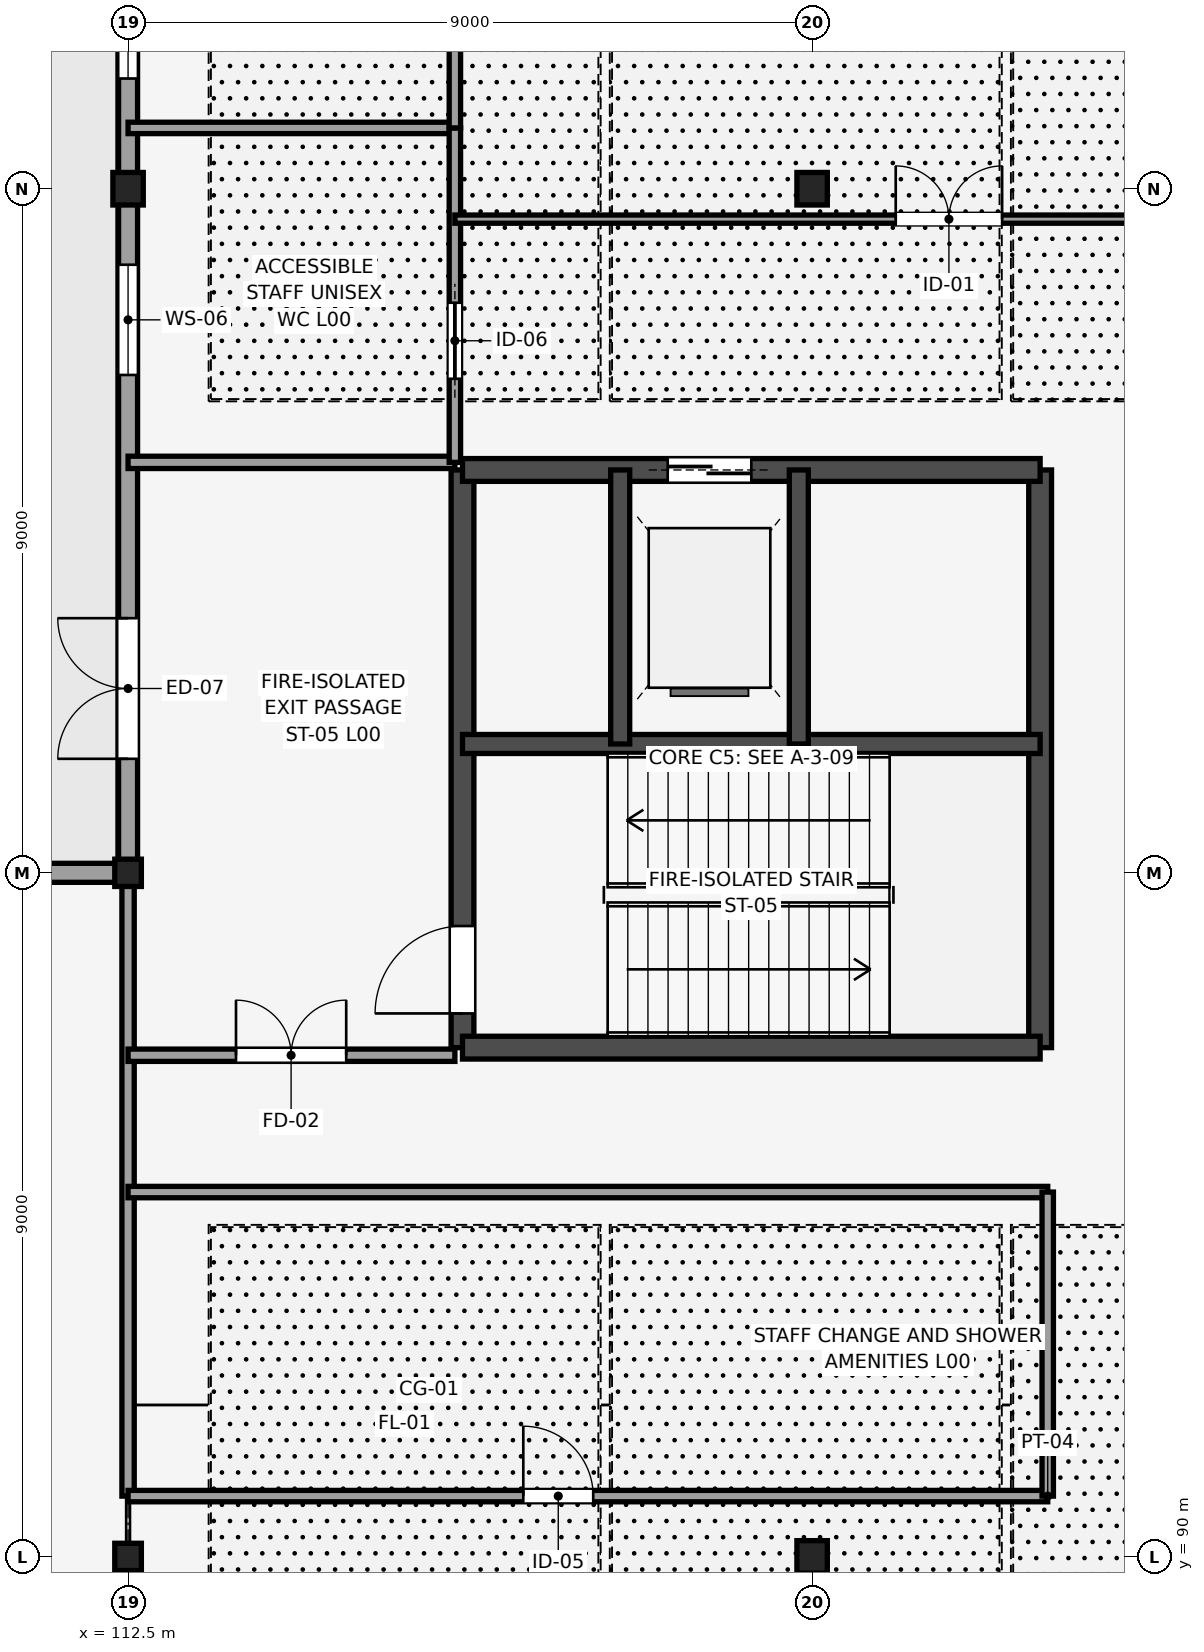
"""IFC4 building model, lengths in metres.
Left out: names, types, materials, properties, quantities, classifications, styles, units other than length and angle.
Written with IfcOpenShell. Run it as: python <this file> out.ifc"""

import sys

from ifc_helpers import new_model, si_unit, direction, frame, frame_2d, origin, origin_2d, place, context, subcontext, project, spatial, rectangle, i_section, extrude, element, fill, save


model = new_model("IFC4")
c1 = context("Model", 3, precision=1e-05, world=origin(), true_north=direction((0.0, 1.0)))
c2 = subcontext(c1, "Body", "Model", "MODEL_VIEW")
j1 = project(units=[si_unit("LENGTHUNIT", "METRE"), si_unit("PLANEANGLEUNIT", "RADIAN")], contexts=[c1])
p1 = place(None, origin())
s1 = spatial("IfcSite", under=j1, at=p1, CompositionType="ELEMENT")
p2 = place(p1, origin())
s2 = spatial("IfcBuilding", under=s1, at=p2, CompositionType="ELEMENT")
p3 = place(p2, origin())
s3 = spatial("IfcBuildingStorey", under=s2, at=p3, CompositionType="ELEMENT", Elevation=0.0)
for number, where, z_axis, x_axis in (
    (1, (112.5, 90.0, 0.0), (0.0, 0.0, 1.0), (1.0, 0.0, 0.0)),
    (2, (112.5, 99.0, 0.0), (0.0, 0.0, 1.0), (1.0, 0.0, 0.0)),
):
    element("IfcColumn", number, at=place(p3, frame(where, z_axis=z_axis, x_axis=x_axis)), inside=s3, PredefinedType="COLUMN", context=c2, shape_type="SweptSolid", body=[
        extrude(i_section(OverallWidth=0.35, OverallDepth=0.359, WebThickness=0.016, FlangeThickness=0.024, FilletRadius=0.014, at=origin_2d()), origin(), (0.0, 0.0, 1.0), 5.4),
    ])
for number, where, z_axis, x_axis in (
    (3, (112.5, 108.0, 0.0), (0.0, 0.0, 1.0), (1.0, 0.0, 0.0)),
    (4, (121.5, 90.0, 0.0), (0.0, 0.0, 1.0), (1.0, 0.0, 0.0)),
    (5, (121.5, 108.0, 0.0), (0.0, 0.0, 1.0), (1.0, 0.0, 0.0)),
):
    element("IfcColumn", number, at=place(p3, frame(where, z_axis=z_axis, x_axis=x_axis)), inside=s3, PredefinedType="COLUMN", context=c2, shape_type="SweptSolid", body=[
        extrude(i_section(OverallWidth=0.4, OverallDepth=0.428, WebThickness=0.02, FlangeThickness=0.028, FilletRadius=0.016, at=origin_2d()), origin(), (0.0, 0.0, 1.0), 5.4),
    ])
p4 = place(p3, frame((116.9, 96.7, 0.0), z_axis=(0.0, 0.0, 1.0), x_axis=(0.0, 1.0, 0.0)))
e6 = element("IfcWall", 6, at=p4, inside=s3, PredefinedType="SHEAR", context=c2, shape_type="SweptSolid", body=[
    extrude(rectangle(XDim=7.6, YDim=0.3, at=frame_2d((3.8, 0.0))), origin(), (0.0, 0.0, 1.0), 5.4),
])
p5 = place(p4, frame((0.45, 0.0, 0.0)))
e7 = element("IfcOpeningElement", 7, at=p5, cuts=e6, PredefinedType="OPENING", context=c2, shape_type="SweptSolid", body=[
    extrude(rectangle(XDim=1.15, YDim=2.15, at=frame_2d((0.575, 1.075))), frame((0.0, 0.16, 0.0), z_axis=(0.0, -1.0, 0.0), x_axis=(1.0, 0.0, 0.0)), (0.0, 0.0, 1.0), 0.32),
])
for number, where, z_axis, x_axis in (
    (8, (124.5, 96.7, 0.0), (0.0, 0.0, 1.0), (0.0, 1.0, 0.0)),
    (9, (116.9, 96.7, 0.0), (0.0, 0.0, 1.0), (1.0, 0.0, 0.0)),
):
    element("IfcWall", number, at=place(p3, frame(where, z_axis=z_axis, x_axis=x_axis)), inside=s3, PredefinedType="SHEAR", context=c2, shape_type="SweptSolid", body=[
        extrude(rectangle(XDim=7.6, YDim=0.3, at=frame_2d((3.8, 0.0))), origin(), (0.0, 0.0, 1.0), 5.4),
    ])
p6 = place(p3, frame((116.9, 104.3, 0.0), z_axis=(0.0, 0.0, 1.0), x_axis=(1.0, 0.0, 0.0)))
e10 = element("IfcWall", 10, at=p6, inside=s3, PredefinedType="SHEAR", context=c2, shape_type="SweptSolid", body=[
    extrude(rectangle(XDim=7.6, YDim=0.3, at=frame_2d((3.8, 0.0))), origin(), (0.0, 0.0, 1.0), 5.4),
])
p7 = place(p6, frame((2.7, 0.0, 0.0)))
e11 = element("IfcOpeningElement", 11, at=p7, cuts=e10, PredefinedType="OPENING", context=c2, shape_type="SweptSolid", body=[
    extrude(rectangle(XDim=1.1, YDim=2.2, at=frame_2d((0.55, 1.1))), frame((0.0, 0.16, 0.0), z_axis=(0.0, -1.0, 0.0), x_axis=(1.0, 0.0, 0.0)), (0.0, 0.0, 1.0), 0.32),
])
p8 = place(p3, frame((116.9, 100.695, 0.0), z_axis=(0.0, 0.0, 1.0), x_axis=(1.0, 0.0, 0.0)))
e12 = element("IfcWall", 12, at=p8, inside=s3, PredefinedType="SHEAR", context=c2, shape_type="SweptSolid", body=[
    extrude(rectangle(XDim=7.6, YDim=0.25, at=frame_2d((3.8, 0.0))), origin(), (0.0, 0.0, 1.0), 5.4),
])
for number, where, z_axis, x_axis in (
    (13, (118.975, 100.695, 0.0), (0.0, 0.0, 1.0), (0.0, 1.0, 0.0)),
    (14, (121.325, 100.695, 0.0), (0.0, 0.0, 1.0), (0.0, 1.0, 0.0)),
):
    element("IfcWall", number, at=place(p3, frame(where, z_axis=z_axis, x_axis=x_axis)), inside=s3, PredefinedType="SHEAR", context=c2, shape_type="SweptSolid", body=[
        extrude(rectangle(XDim=3.605, YDim=0.25, at=frame_2d((1.802, 0.0))), origin(), (0.0, 0.0, 1.0), 5.4),
    ])
p9 = place(p3, frame((112.5, 99.0, 0.0), z_axis=(0.0, 0.0, 1.0), x_axis=(-1.0, 0.0, 0.0)))
e15 = element("IfcWall", 15, at=p9, inside=s3, PredefinedType="STANDARD", context=c2, shape_type="SweptSolid", body=[
    extrude(rectangle(XDim=13.5, YDim=0.25, at=frame_2d((6.75, 0.0))), origin(), (0.0, 0.0, 1.0), 4.667),
])
p10 = place(p9, frame((1.35, 0.0, 1.0)))
e16 = element("IfcOpeningElement", 16, at=p10, cuts=e15, PredefinedType="OPENING", context=c2, shape_type="SweptSolid", body=[
    extrude(rectangle(XDim=1.8, YDim=1.5, at=frame_2d((0.9, 0.75))), frame((0.0, 0.135, 0.0), z_axis=(0.0, -1.0, 0.0), x_axis=(1.0, 0.0, 0.0)), (0.0, 0.0, 1.0), 0.27),
])
p11 = place(p9, frame((9.6, 0.0, 1.0)))
e17 = element("IfcOpeningElement", 17, at=p11, cuts=e15, PredefinedType="OPENING", context=c2, shape_type="SweptSolid", body=[
    extrude(rectangle(XDim=1.8, YDim=1.5, at=frame_2d((0.9, 0.75))), frame((0.0, 0.135, 0.0), z_axis=(0.0, -1.0, 0.0), x_axis=(1.0, 0.0, 0.0)), (0.0, 0.0, 1.0), 0.27),
])
p12 = place(p9, frame((5.6, 0.0, 1.0)))
e18 = element("IfcOpeningElement", 18, at=p12, cuts=e15, PredefinedType="OPENING", context=c2, shape_type="SweptSolid", body=[
    extrude(rectangle(XDim=3.0, YDim=1.5, at=frame_2d((1.5, 0.75))), frame((0.0, 0.135, 0.0), z_axis=(0.0, -1.0, 0.0), x_axis=(1.0, 0.0, 0.0)), (0.0, 0.0, 1.0), 0.27),
])
p13 = place(p3, frame((112.5, 99.0, 0.0), z_axis=(0.0, 0.0, 1.0), x_axis=(0.0, 1.0, 0.0)))
e19 = element("IfcWall", 19, at=p13, inside=s3, PredefinedType="STANDARD", context=c2, shape_type="SweptSolid", body=[
    extrude(rectangle(XDim=12.6, YDim=0.25, at=frame_2d((6.3, 0.0))), origin(), (0.0, 0.0, 1.0), 4.746),
])
p14 = place(p13, frame((10.45, 0.0, 1.0)))
e20 = element("IfcOpeningElement", 20, at=p14, cuts=e19, PredefinedType="OPENING", context=c2, shape_type="SweptSolid", body=[
    extrude(rectangle(XDim=1.5, YDim=1.5, at=frame_2d((0.75, 0.75))), frame((0.0, 0.135, 0.0), z_axis=(0.0, -1.0, 0.0), x_axis=(1.0, 0.0, 0.0)), (0.0, 0.0, 1.0), 0.27),
])
p15 = place(p13, frame((1.5, 0.0, 0.0)))
e21 = element("IfcOpeningElement", 21, at=p15, cuts=e19, PredefinedType="OPENING", context=c2, shape_type="SweptSolid", body=[
    extrude(rectangle(XDim=1.85, YDim=2.2, at=frame_2d((0.925, 1.1))), frame((0.0, 0.135, 0.0), z_axis=(0.0, -1.0, 0.0), x_axis=(1.0, 0.0, 0.0)), (0.0, 0.0, 1.0), 0.27),
])
p16 = place(p13, frame((6.55, 0.0, 1.0)))
e22 = element("IfcOpeningElement", 22, at=p16, cuts=e19, PredefinedType="OPENING", context=c2, shape_type="SweptSolid", body=[
    extrude(rectangle(XDim=1.45, YDim=1.55, at=frame_2d((0.725, 0.775))), frame((0.0, 0.135, 0.0), z_axis=(0.0, -1.0, 0.0), x_axis=(1.0, 0.0, 0.0)), (0.0, 0.0, 1.0), 0.27),
])
p17 = place(p3, frame((112.5, 90.8, 0.0), z_axis=(0.0, 0.0, 1.0), x_axis=(0.0, 1.0, 0.0)))
e23 = element("IfcWall", 23, at=p17, inside=s3, PredefinedType="PARTITIONING", context=c2, shape_type="SweptSolid", body=[
    extrude(rectangle(XDim=8.2, YDim=0.162, at=frame_2d((4.1, 0.0))), origin(), (0.0, 0.0, 1.0), 4.746),
])
p18 = place(p3, frame((112.5, 90.8, 0.0), z_axis=(0.0, 0.0, 1.0), x_axis=(1.0, 0.0, 0.0)))
e24 = element("IfcWall", 24, at=p18, inside=s3, PredefinedType="PARTITIONING", context=c2, shape_type="SweptSolid", body=[
    extrude(rectangle(XDim=12.1, YDim=0.15, at=frame_2d((6.05, 0.0))), origin(), (0.0, 0.0, 1.0), 5.22),
])
p19 = place(p18, frame((5.2, 0.0, 0.0)))
e25 = element("IfcOpeningElement", 25, at=p19, cuts=e24, PredefinedType="OPENING", context=c2, shape_type="SweptSolid", body=[
    extrude(rectangle(XDim=0.92, YDim=2.15, at=frame_2d((0.46, 1.075))), frame((0.0, 0.085, 0.0), z_axis=(0.0, -1.0, 0.0), x_axis=(1.0, 0.0, 0.0)), (0.0, 0.0, 1.0), 0.17),
])
p20 = place(p3, frame((112.5, 94.8, 0.0), z_axis=(0.0, 0.0, 1.0), x_axis=(1.0, 0.0, 0.0)))
e26 = element("IfcWall", 26, at=p20, inside=s3, PredefinedType="PARTITIONING", context=c2, shape_type="SweptSolid", body=[
    extrude(rectangle(XDim=12.1, YDim=0.15, at=frame_2d((6.05, 0.0))), origin(), (0.0, 0.0, 1.0), 5.22),
])
p21 = place(p3, frame((124.6, 90.8, 0.0), z_axis=(0.0, 0.0, 1.0), x_axis=(0.0, 1.0, 0.0)))
e27 = element("IfcWall", 27, at=p21, inside=s3, PredefinedType="PARTITIONING", context=c2, shape_type="SweptSolid", body=[
    extrude(rectangle(XDim=4.0, YDim=0.15, at=frame_2d((2.0, 0.0))), origin(), (0.0, 0.0, 1.0), 5.22),
])
p22 = place(p3, frame((112.5, 96.6, 0.0), z_axis=(0.0, 0.0, 1.0), x_axis=(1.0, 0.0, 0.0)))
e28 = element("IfcWall", 28, at=p22, inside=s3, PredefinedType="PARTITIONING", context=c2, shape_type="SweptSolid", body=[
    extrude(rectangle(XDim=4.3, YDim=0.162, at=frame_2d((2.15, 0.0))), origin(), (0.0, 0.0, 1.0), 5.22),
])
p23 = place(p22, frame((1.42, 0.0, 0.0)))
e29 = element("IfcOpeningElement", 29, at=p23, cuts=e28, PredefinedType="OPENING", context=c2, shape_type="SweptSolid", body=[
    extrude(rectangle(XDim=1.45, YDim=2.2, at=frame_2d((0.725, 1.1))), frame((0.0, 0.091, 0.0), z_axis=(0.0, -1.0, 0.0), x_axis=(1.0, 0.0, 0.0)), (0.0, 0.0, 1.0), 0.182),
])
p24 = place(p3, frame((112.5, 104.4, 0.0), z_axis=(0.0, 0.0, 1.0), x_axis=(1.0, 0.0, 0.0)))
e30 = element("IfcWall", 30, at=p24, inside=s3, PredefinedType="PARTITIONING", context=c2, shape_type="SweptSolid", body=[
    extrude(rectangle(XDim=4.3, YDim=0.162, at=frame_2d((2.15, 0.0))), origin(), (0.0, 0.0, 1.0), 5.22),
])
p25 = place(p3, frame((112.5, 108.8, 0.0), z_axis=(0.0, 0.0, 1.0), x_axis=(1.0, 0.0, 0.0)))
e31 = element("IfcWall", 31, at=p25, inside=s3, PredefinedType="PARTITIONING", context=c2, shape_type="SweptSolid", body=[
    extrude(rectangle(XDim=4.3, YDim=0.15, at=frame_2d((2.15, 0.0))), origin(), (0.0, 0.0, 1.0), 5.22),
])
p26 = place(p3, frame((116.8, 104.4, 0.0), z_axis=(0.0, 0.0, 1.0), x_axis=(0.0, 1.0, 0.0)))
e32 = element("IfcWall", 32, at=p26, inside=s3, PredefinedType="PARTITIONING", context=c2, shape_type="SweptSolid", body=[
    extrude(rectangle(XDim=4.4, YDim=0.15, at=frame_2d((2.2, 0.0))), origin(), (0.0, 0.0, 1.0), 5.22),
])
p27 = place(p26, frame((1.1, 0.0, 0.0)))
e33 = element("IfcOpeningElement", 33, at=p27, cuts=e32, PredefinedType="OPENING", context=c2, shape_type="SweptSolid", body=[
    extrude(rectangle(XDim=1.0, YDim=2.15, at=frame_2d((0.5, 1.075))), frame((0.0, 0.085, 0.0), z_axis=(0.0, -1.0, 0.0), x_axis=(1.0, 0.0, 0.0)), (0.0, 0.0, 1.0), 0.17),
])
p28 = place(p3, frame((116.8, 108.8, 0.0), z_axis=(0.0, 0.0, 1.0), x_axis=(0.0, 1.0, 0.0)))
e34 = element("IfcWall", 34, at=p28, inside=s3, PredefinedType="PARTITIONING", context=c2, shape_type="SweptSolid", body=[
    extrude(rectangle(XDim=2.8, YDim=0.15, at=frame_2d((1.4, 0.0))), origin(), (0.0, 0.0, 1.0), 5.22),
])
p29 = place(p3, frame((116.8, 107.6, 0.0), z_axis=(0.0, 0.0, 1.0), x_axis=(1.0, 0.0, 0.0)))
e35 = element("IfcWall", 35, at=p29, inside=s3, PredefinedType="PARTITIONING", context=c2, shape_type="SweptSolid", body=[
    extrude(rectangle(XDim=14.6, YDim=0.108, at=frame_2d((7.3, 0.0))), origin(), (0.0, 0.0, 1.0), 5.22),
])
p30 = place(p29, frame((5.8, 0.0, 0.0)))
e36 = element("IfcOpeningElement", 36, at=p30, cuts=e35, PredefinedType="OPENING", context=c2, shape_type="SweptSolid", body=[
    extrude(rectangle(XDim=1.4, YDim=2.2, at=frame_2d((0.7, 1.1))), frame((0.0, 0.064, 0.0), z_axis=(0.0, -1.0, 0.0), x_axis=(1.0, 0.0, 0.0)), (0.0, 0.0, 1.0), 0.128),
])
p31 = place(p14, origin())
e37 = element("IfcWindow", 37, at=p31, inside=s3, PartitioningType="SINGLE_PANEL", PredefinedType="WINDOW", context=c2, shape_type="SweptSolid", body=[
    extrude(rectangle(XDim=1.5, YDim=1.5, at=frame_2d((0.75, 0.75))), frame((0.0, 0.03, 0.0), z_axis=(0.0, -1.0, 0.0), x_axis=(1.0, 0.0, 0.0)), (0.0, 0.0, 1.0), 0.06),
])
fill(e20, e37)
p32 = place(p15, origin())
e38 = element("IfcDoor", 38, at=p32, inside=s3, OperationType="DOUBLE_DOOR_SINGLE_SWING", PredefinedType="DOOR", context=c2, shape_type="SweptSolid", body=[
    extrude(rectangle(XDim=1.85, YDim=2.2, at=frame_2d((0.925, 1.1))), frame((0.0, 0.025, 0.0), z_axis=(0.0, -1.0, 0.0), x_axis=(1.0, 0.0, 0.0)), (0.0, 0.0, 1.0), 0.05),
])
fill(e21, e38)
p33 = place(p16, origin())
e39 = element("IfcWindow", 39, at=p33, inside=s3, PartitioningType="SINGLE_PANEL", PredefinedType="WINDOW", context=c2, shape_type="SweptSolid", body=[
    extrude(rectangle(XDim=1.45, YDim=1.55, at=frame_2d((0.725, 0.775))), frame((0.0, 0.03, 0.0), z_axis=(0.0, -1.0, 0.0), x_axis=(1.0, 0.0, 0.0)), (0.0, 0.0, 1.0), 0.06),
])
fill(e22, e39)
p34 = place(p5, origin())
e40 = element("IfcDoor", 40, at=p34, inside=s3, OperationType="SINGLE_SWING_LEFT", PredefinedType="DOOR", context=c2, shape_type="SweptSolid", body=[
    extrude(rectangle(XDim=1.15, YDim=2.15, at=frame_2d((0.575, 1.075))), frame((0.0, 0.025, 0.0), z_axis=(0.0, -1.0, 0.0), x_axis=(1.0, 0.0, 0.0)), (0.0, 0.0, 1.0), 0.05),
])
fill(e7, e40)
p35 = place(p7, origin())
e41 = element("IfcDoor", 41, at=p35, inside=s3, OperationType="DOUBLE_DOOR_SLIDING", PredefinedType="DOOR", context=c2, shape_type="SweptSolid", body=[
    extrude(rectangle(XDim=1.1, YDim=2.2, at=frame_2d((0.55, 1.1))), frame((0.0, 0.025, 0.0), z_axis=(0.0, -1.0, 0.0), x_axis=(1.0, 0.0, 0.0)), (0.0, 0.0, 1.0), 0.05),
])
fill(e11, e41)
p36 = place(p19, origin())
e42 = element("IfcDoor", 42, at=p36, inside=s3, OperationType="SINGLE_SWING_LEFT", PredefinedType="DOOR", context=c2, shape_type="SweptSolid", body=[
    extrude(rectangle(XDim=0.92, YDim=2.15, at=frame_2d((0.46, 1.075))), frame((0.0, 0.025, 0.0), z_axis=(0.0, -1.0, 0.0), x_axis=(1.0, 0.0, 0.0)), (0.0, 0.0, 1.0), 0.05),
])
fill(e25, e42)
p37 = place(p23, origin())
e43 = element("IfcDoor", 43, at=p37, inside=s3, OperationType="DOUBLE_DOOR_SINGLE_SWING", PredefinedType="DOOR", context=c2, shape_type="SweptSolid", body=[
    extrude(rectangle(XDim=1.45, YDim=2.2, at=frame_2d((0.725, 1.1))), frame((0.0, 0.025, 0.0), z_axis=(0.0, -1.0, 0.0), x_axis=(1.0, 0.0, 0.0)), (0.0, 0.0, 1.0), 0.05),
])
fill(e29, e43)
p38 = place(p27, origin())
e44 = element("IfcDoor", 44, at=p38, inside=s3, OperationType="SLIDING_TO_LEFT", PredefinedType="DOOR", context=c2, shape_type="SweptSolid", body=[
    extrude(rectangle(XDim=1.0, YDim=2.15, at=frame_2d((0.5, 1.075))), frame((0.0, 0.025, 0.0), z_axis=(0.0, -1.0, 0.0), x_axis=(1.0, 0.0, 0.0)), (0.0, 0.0, 1.0), 0.05),
])
fill(e33, e44)
p39 = place(p30, origin())
e45 = element("IfcDoor", 45, at=p39, inside=s3, OperationType="DOUBLE_DOOR_SINGLE_SWING", PredefinedType="DOOR", context=c2, shape_type="SweptSolid", body=[
    extrude(rectangle(XDim=1.4, YDim=2.2, at=frame_2d((0.7, 1.1))), frame((0.0, 0.025, 0.0), z_axis=(0.0, -1.0, 0.0), x_axis=(1.0, 0.0, 0.0)), (0.0, 0.0, 1.0), 0.05),
])
fill(e36, e45)
save(model, sys.argv[1])
